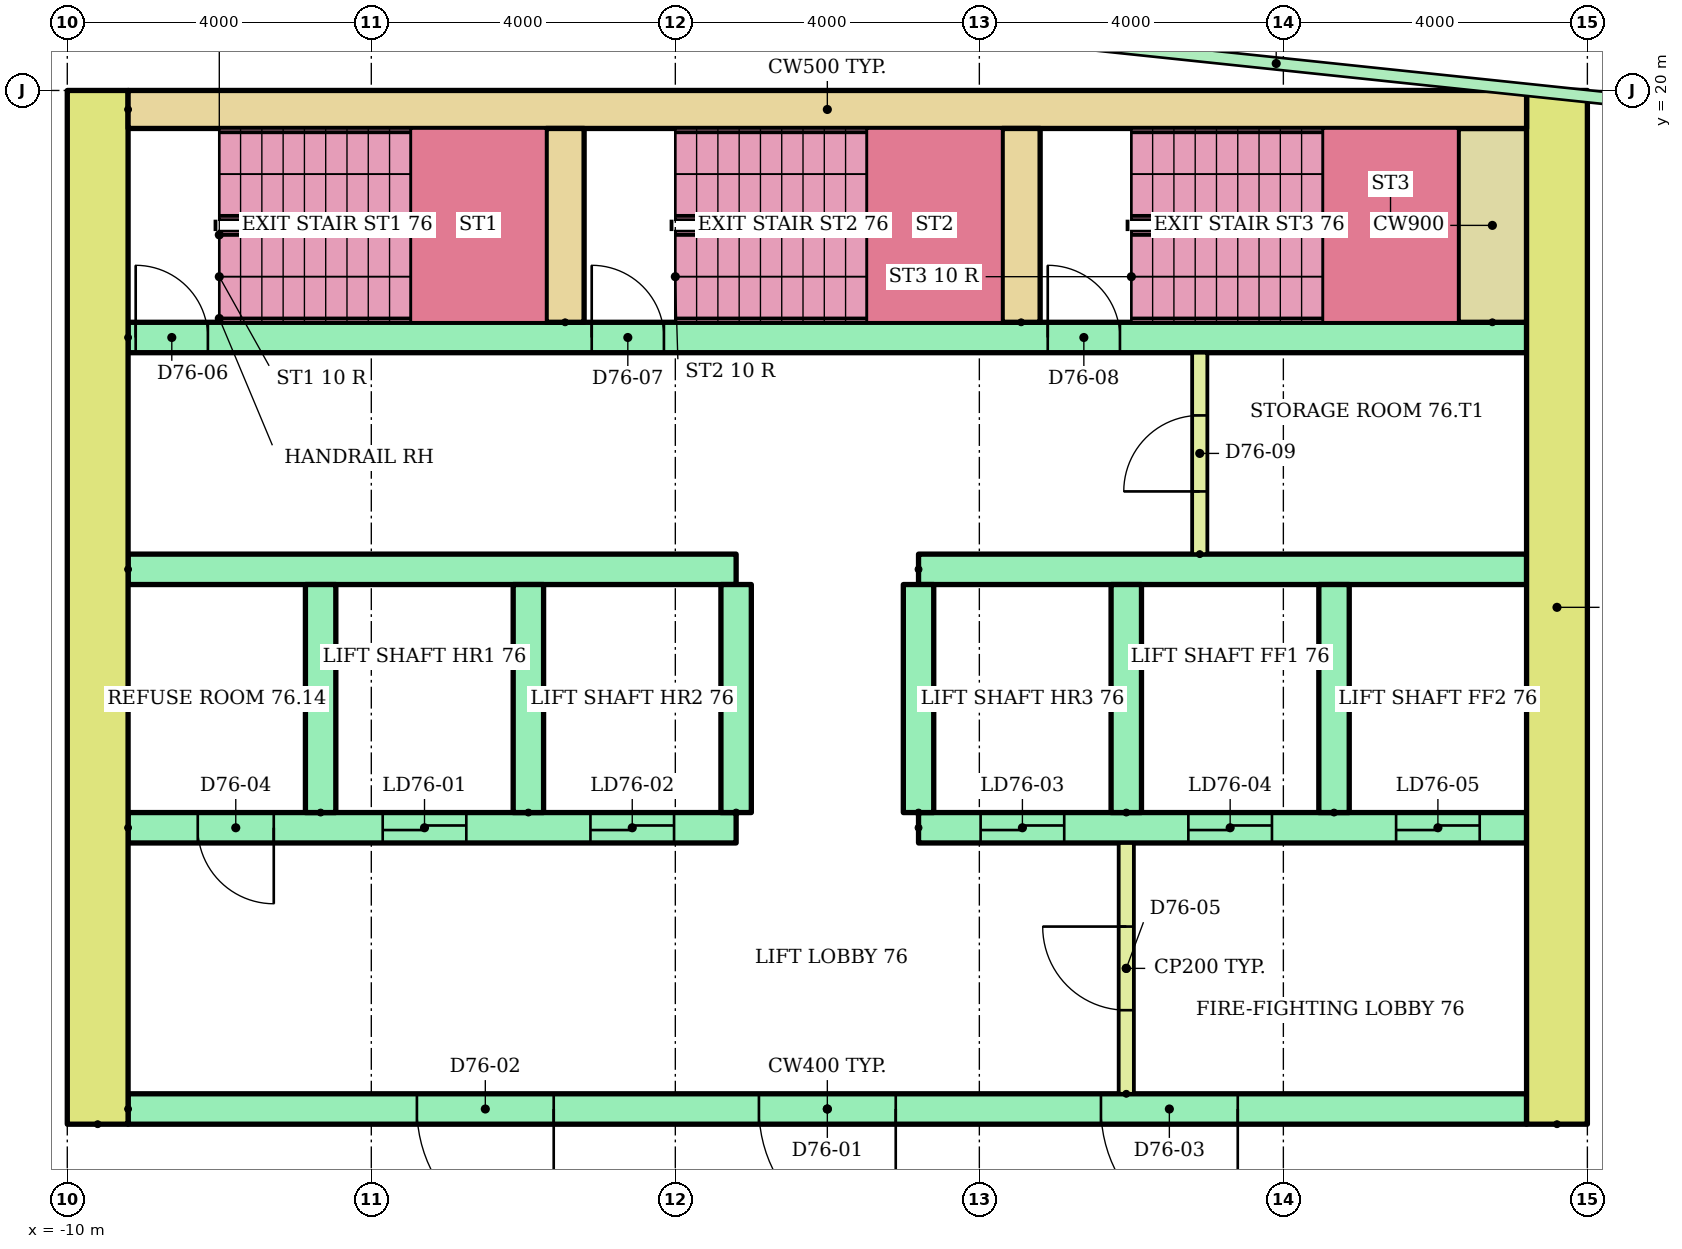
"""IFC4 building model, lengths in metres.
Left out: names, types, materials, properties, quantities, classifications, styles, units other than length and angle.
Written with IfcOpenShell. Run it as: python <this file> out.ifc"""

import sys

from ifc_helpers import new_model, si_unit, direction, frame, frame_2d, origin, place, context, subcontext, project, spatial, rectangle, extrude, element, fill, save


model = new_model("IFC4")
c1 = context("Model", 3, precision=1e-05, world=origin(), true_north=direction((0.0, 1.0)))
c2 = subcontext(c1, "Body", "Model", "MODEL_VIEW")
j1 = project(units=[si_unit("LENGTHUNIT", "METRE"), si_unit("PLANEANGLEUNIT", "RADIAN")], contexts=[c1])
p1 = place(None, origin())
s1 = spatial("IfcSite", under=j1, at=p1, CompositionType="ELEMENT")
p2 = place(p1, origin())
s2 = spatial("IfcBuilding", under=s1, at=p2, CompositionType="ELEMENT")
p3 = place(p2, frame((0.0, 0.0, 294.9)))
s3 = spatial("IfcBuildingStorey", under=s2, at=p3, CompositionType="ELEMENT", Elevation=294.9)
for number, where, z_axis, x_axis in (
    (1, (-9.6, 6.4, 0.0), (0.0, 0.0, 1.0), (0.0, 1.0, 0.0)),
    (2, (9.6, 6.4, 0.0), (0.0, 0.0, 1.0), (0.0, 1.0, 0.0)),
):
    element("IfcWall", number, at=place(p3, frame(where, z_axis=z_axis, x_axis=x_axis)), inside=s3, PredefinedType="SHEAR", context=c2, shape_type="SweptSolid", body=[
        extrude(rectangle(XDim=13.6, YDim=0.8, at=frame_2d((6.8, 0.0))), origin(), (0.0, 0.0, 1.0), 3.12),
    ])
p4 = place(p3, frame((-9.2, 19.75, 0.0)))
e3 = element("IfcWall", 3, at=p4, inside=s3, PredefinedType="SHEAR", context=c2, shape_type="SweptSolid", body=[
    extrude(rectangle(XDim=18.4, YDim=0.5, at=frame_2d((9.2, 0.0))), origin(), (0.0, 0.0, 1.0), 3.12),
])
p5 = place(p3, frame((-9.2, 6.6, 0.0)))
e4 = element("IfcWall", 4, at=p5, inside=s3, PredefinedType="SHEAR", context=c2, shape_type="SweptSolid", body=[
    extrude(rectangle(XDim=18.4, YDim=0.4, at=frame_2d((9.2, 0.0))), origin(), (0.0, 0.0, 1.0), 3.12),
])
p6 = place(p5, frame((8.3, 0.0, 0.0)))
e5 = element("IfcOpeningElement", 5, at=p6, cuts=e4, PredefinedType="OPENING", context=c2, shape_type="SweptSolid", body=[
    extrude(rectangle(XDim=1.8, YDim=2.1, at=frame_2d((0.9, 1.05))), frame((0.0, 0.21, 0.0), z_axis=(0.0, -1.0, 0.0), x_axis=(1.0, 0.0, 0.0)), (0.0, 0.0, 1.0), 0.42),
])
p7 = place(p5, frame((3.8, 0.0, 0.0)))
e6 = element("IfcOpeningElement", 6, at=p7, cuts=e4, PredefinedType="OPENING", context=c2, shape_type="SweptSolid", body=[
    extrude(rectangle(XDim=1.8, YDim=2.1, at=frame_2d((0.9, 1.05))), frame((0.0, 0.21, 0.0), z_axis=(0.0, -1.0, 0.0), x_axis=(1.0, 0.0, 0.0)), (0.0, 0.0, 1.0), 0.42),
])
p8 = place(p5, frame((12.8, 0.0, 0.0)))
e7 = element("IfcOpeningElement", 7, at=p8, cuts=e4, PredefinedType="OPENING", context=c2, shape_type="SweptSolid", body=[
    extrude(rectangle(XDim=1.8, YDim=2.1, at=frame_2d((0.9, 1.05))), frame((0.0, 0.21, 0.0), z_axis=(0.0, -1.0, 0.0), x_axis=(1.0, 0.0, 0.0)), (0.0, 0.0, 1.0), 0.42),
])
p9 = place(p3, frame((-9.2, 10.3, 0.0)))
e8 = element("IfcWall", 8, at=p9, inside=s3, PredefinedType="SHEAR", context=c2, shape_type="SweptSolid", body=[
    extrude(rectangle(XDim=8.0, YDim=0.4, at=frame_2d((4.0, 0.0))), origin(), (0.0, 0.0, 1.0), 3.12),
])
p10 = place(p9, frame((3.35, 0.0, 0.0)))
e9 = element("IfcOpeningElement", 9, at=p10, cuts=e8, PredefinedType="OPENING", context=c2, shape_type="SweptSolid", body=[
    extrude(rectangle(XDim=1.1, YDim=2.1, at=frame_2d((0.55, 1.05))), frame((0.0, 0.21, 0.0), z_axis=(0.0, -1.0, 0.0), x_axis=(1.0, 0.0, 0.0)), (0.0, 0.0, 1.0), 0.42),
])
p11 = place(p9, frame((6.083, 0.0, 0.0)))
e10 = element("IfcOpeningElement", 10, at=p11, cuts=e8, PredefinedType="OPENING", context=c2, shape_type="SweptSolid", body=[
    extrude(rectangle(XDim=1.1, YDim=2.1, at=frame_2d((0.55, 1.05))), frame((0.0, 0.21, 0.0), z_axis=(0.0, -1.0, 0.0), x_axis=(1.0, 0.0, 0.0)), (0.0, 0.0, 1.0), 0.42),
])
p12 = place(p9, frame((0.917, 0.0, 0.0)))
e11 = element("IfcOpeningElement", 11, at=p12, cuts=e8, PredefinedType="OPENING", context=c2, shape_type="SweptSolid", body=[
    extrude(rectangle(XDim=1.0, YDim=2.1, at=frame_2d((0.5, 1.05))), frame((0.0, 0.21, 0.0), z_axis=(0.0, -1.0, 0.0), x_axis=(1.0, 0.0, 0.0)), (0.0, 0.0, 1.0), 0.42),
])
p13 = place(p3, frame((-9.2, 13.7, 0.0)))
e12 = element("IfcWall", 12, at=p13, inside=s3, PredefinedType="SHEAR", context=c2, shape_type="SweptSolid", body=[
    extrude(rectangle(XDim=8.0, YDim=0.4, at=frame_2d((4.0, 0.0))), origin(), (0.0, 0.0, 1.0), 3.12),
])
p14 = place(p3, frame((1.2, 10.3, 0.0)))
e13 = element("IfcWall", 13, at=p14, inside=s3, PredefinedType="SHEAR", context=c2, shape_type="SweptSolid", body=[
    extrude(rectangle(XDim=8.0, YDim=0.4, at=frame_2d((4.0, 0.0))), origin(), (0.0, 0.0, 1.0), 3.12),
])
p15 = place(p14, frame((0.817, 0.0, 0.0)))
e14 = element("IfcOpeningElement", 14, at=p15, cuts=e13, PredefinedType="OPENING", context=c2, shape_type="SweptSolid", body=[
    extrude(rectangle(XDim=1.1, YDim=2.1, at=frame_2d((0.55, 1.05))), frame((0.0, 0.21, 0.0), z_axis=(0.0, -1.0, 0.0), x_axis=(1.0, 0.0, 0.0)), (0.0, 0.0, 1.0), 0.42),
])
p16 = place(p14, frame((3.55, 0.0, 0.0)))
e15 = element("IfcOpeningElement", 15, at=p16, cuts=e13, PredefinedType="OPENING", context=c2, shape_type="SweptSolid", body=[
    extrude(rectangle(XDim=1.1, YDim=2.1, at=frame_2d((0.55, 1.05))), frame((0.0, 0.21, 0.0), z_axis=(0.0, -1.0, 0.0), x_axis=(1.0, 0.0, 0.0)), (0.0, 0.0, 1.0), 0.42),
])
p17 = place(p14, frame((6.283, 0.0, 0.0)))
e16 = element("IfcOpeningElement", 16, at=p17, cuts=e13, PredefinedType="OPENING", context=c2, shape_type="SweptSolid", body=[
    extrude(rectangle(XDim=1.1, YDim=2.1, at=frame_2d((0.55, 1.05))), frame((0.0, 0.21, 0.0), z_axis=(0.0, -1.0, 0.0), x_axis=(1.0, 0.0, 0.0)), (0.0, 0.0, 1.0), 0.42),
])
p18 = place(p3, frame((1.2, 13.7, 0.0)))
e17 = element("IfcWall", 17, at=p18, inside=s3, PredefinedType="SHEAR", context=c2, shape_type="SweptSolid", body=[
    extrude(rectangle(XDim=8.0, YDim=0.4, at=frame_2d((4.0, 0.0))), origin(), (0.0, 0.0, 1.0), 3.12),
])
for number, where, z_axis, x_axis in (
    (18, (-6.667, 10.5, 0.0), (0.0, 0.0, 1.0), (0.0, 1.0, 0.0)),
    (19, (-3.933, 10.5, 0.0), (0.0, 0.0, 1.0), (0.0, 1.0, 0.0)),
    (20, (-1.2, 10.5, 0.0), (0.0, 0.0, 1.0), (0.0, 1.0, 0.0)),
    (21, (1.2, 10.5, 0.0), (0.0, 0.0, 1.0), (0.0, 1.0, 0.0)),
    (22, (3.933, 10.5, 0.0), (0.0, 0.0, 1.0), (0.0, 1.0, 0.0)),
    (23, (6.667, 10.5, 0.0), (0.0, 0.0, 1.0), (0.0, 1.0, 0.0)),
):
    element("IfcWall", number, at=place(p3, frame(where, z_axis=z_axis, x_axis=x_axis)), inside=s3, PredefinedType="SHEAR", context=c2, shape_type="SweptSolid", body=[
        extrude(rectangle(XDim=3.0, YDim=0.4, at=frame_2d((1.5, 0.0))), origin(), (0.0, 0.0, 1.0), 3.12),
    ])
p19 = place(p3, frame((3.933, 6.8, 0.0), z_axis=(0.0, 0.0, 1.0), x_axis=(0.0, 1.0, 0.0)))
e24 = element("IfcWall", 24, at=p19, inside=s3, PredefinedType="PARTITIONING", context=c2, shape_type="SweptSolid", body=[
    extrude(rectangle(XDim=3.3, YDim=0.2, at=frame_2d((1.65, 0.0))), origin(), (0.0, 0.0, 1.0), 3.12),
])
p20 = place(p19, frame((1.1, 0.0, 0.0)))
e25 = element("IfcOpeningElement", 25, at=p20, cuts=e24, PredefinedType="OPENING", context=c2, shape_type="SweptSolid", body=[
    extrude(rectangle(XDim=1.1, YDim=2.1, at=frame_2d((0.55, 1.05))), frame((0.0, 0.11, 0.0), z_axis=(0.0, -1.0, 0.0), x_axis=(1.0, 0.0, 0.0)), (0.0, 0.0, 1.0), 0.22),
])
p21 = place(p3, frame((-9.2, 16.75, 0.0)))
e26 = element("IfcWall", 26, at=p21, inside=s3, PredefinedType="SHEAR", context=c2, shape_type="SweptSolid", body=[
    extrude(rectangle(XDim=18.4, YDim=0.4, at=frame_2d((9.2, 0.0))), origin(), (0.0, 0.0, 1.0), 3.12),
])
p22 = place(p21, frame((0.1, 0.0, 0.0)))
e27 = element("IfcOpeningElement", 27, at=p22, cuts=e26, PredefinedType="OPENING", context=c2, shape_type="SweptSolid", body=[
    extrude(rectangle(XDim=0.95, YDim=2.1, at=frame_2d((0.475, 1.05))), frame((0.0, 0.21, 0.0), z_axis=(0.0, -1.0, 0.0), x_axis=(1.0, 0.0, 0.0)), (0.0, 0.0, 1.0), 0.42),
])
p23 = place(p21, frame((6.1, 0.0, 0.0)))
e28 = element("IfcOpeningElement", 28, at=p23, cuts=e26, PredefinedType="OPENING", context=c2, shape_type="SweptSolid", body=[
    extrude(rectangle(XDim=0.95, YDim=2.1, at=frame_2d((0.475, 1.05))), frame((0.0, 0.21, 0.0), z_axis=(0.0, -1.0, 0.0), x_axis=(1.0, 0.0, 0.0)), (0.0, 0.0, 1.0), 0.42),
])
p24 = place(p21, frame((12.1, 0.0, 0.0)))
e29 = element("IfcOpeningElement", 29, at=p24, cuts=e26, PredefinedType="OPENING", context=c2, shape_type="SweptSolid", body=[
    extrude(rectangle(XDim=0.95, YDim=2.1, at=frame_2d((0.475, 1.05))), frame((0.0, 0.21, 0.0), z_axis=(0.0, -1.0, 0.0), x_axis=(1.0, 0.0, 0.0)), (0.0, 0.0, 1.0), 0.42),
])
for number, where, z_axis, x_axis in (
    (30, (-3.45, 16.95, 0.0), (0.0, 0.0, 1.0), (0.0, 1.0, 0.0)),
    (31, (2.55, 16.95, 0.0), (0.0, 0.0, 1.0), (0.0, 1.0, 0.0)),
):
    element("IfcWall", number, at=place(p3, frame(where, z_axis=z_axis, x_axis=x_axis)), inside=s3, PredefinedType="SHEAR", context=c2, shape_type="SweptSolid", body=[
        extrude(rectangle(XDim=2.55, YDim=0.5, at=frame_2d((1.275, 0.0))), origin(), (0.0, 0.0, 1.0), 3.12),
    ])
p25 = place(p3, frame((8.75, 16.95, 0.0), z_axis=(0.0, 0.0, 1.0), x_axis=(0.0, 1.0, 0.0)))
e32 = element("IfcWall", 32, at=p25, inside=s3, PredefinedType="SHEAR", context=c2, shape_type="SweptSolid", body=[
    extrude(rectangle(XDim=2.55, YDim=0.9, at=frame_2d((1.275, 0.0))), origin(), (0.0, 0.0, 1.0), 3.12),
])
p26 = place(p3, frame((4.9, 13.9, 0.0), z_axis=(0.0, 0.0, 1.0), x_axis=(0.0, 1.0, 0.0)))
e33 = element("IfcWall", 33, at=p26, inside=s3, PredefinedType="PARTITIONING", context=c2, shape_type="SweptSolid", body=[
    extrude(rectangle(XDim=2.65, YDim=0.2, at=frame_2d((1.325, 0.0))), origin(), (0.0, 0.0, 1.0), 3.12),
])
p27 = place(p26, frame((0.825, 0.0, 0.0)))
e34 = element("IfcOpeningElement", 34, at=p27, cuts=e33, PredefinedType="OPENING", context=c2, shape_type="SweptSolid", body=[
    extrude(rectangle(XDim=1.0, YDim=2.1, at=frame_2d((0.5, 1.05))), frame((0.0, 0.11, 0.0), z_axis=(0.0, -1.0, 0.0), x_axis=(1.0, 0.0, 0.0)), (0.0, 0.0, 1.0), 0.22),
])
p28 = place(p6, frame((1.8, 0.0, 0.0), z_axis=(0.0, 0.0, 1.0), x_axis=(-1.0, 0.0, 0.0)))
e35 = element("IfcDoor", 35, at=p28, inside=s3, OperationType="DOUBLE_DOOR_SINGLE_SWING", PredefinedType="DOOR", context=c2, shape_type="SweptSolid", body=[
    extrude(rectangle(XDim=1.8, YDim=2.1, at=frame_2d((0.9, 1.05))), frame((0.0, 0.025, 0.0), z_axis=(0.0, -1.0, 0.0), x_axis=(1.0, 0.0, 0.0)), (0.0, 0.0, 1.0), 0.05),
])
fill(e5, e35)
p29 = place(p7, frame((1.8, 0.0, 0.0), z_axis=(0.0, 0.0, 1.0), x_axis=(-1.0, 0.0, 0.0)))
e36 = element("IfcDoor", 36, at=p29, inside=s3, OperationType="DOUBLE_DOOR_SINGLE_SWING", PredefinedType="DOOR", context=c2, shape_type="SweptSolid", body=[
    extrude(rectangle(XDim=1.8, YDim=2.1, at=frame_2d((0.9, 1.05))), frame((0.0, 0.025, 0.0), z_axis=(0.0, -1.0, 0.0), x_axis=(1.0, 0.0, 0.0)), (0.0, 0.0, 1.0), 0.05),
])
fill(e6, e36)
p30 = place(p8, frame((1.8, 0.0, 0.0), z_axis=(0.0, 0.0, 1.0), x_axis=(-1.0, 0.0, 0.0)))
e37 = element("IfcDoor", 37, at=p30, inside=s3, OperationType="DOUBLE_DOOR_SINGLE_SWING", PredefinedType="DOOR", context=c2, shape_type="SweptSolid", body=[
    extrude(rectangle(XDim=1.8, YDim=2.1, at=frame_2d((0.9, 1.05))), frame((0.0, 0.025, 0.0), z_axis=(0.0, -1.0, 0.0), x_axis=(1.0, 0.0, 0.0)), (0.0, 0.0, 1.0), 0.05),
])
fill(e7, e37)
p31 = place(p10, origin())
e38 = element("IfcDoor", 38, at=p31, inside=s3, OperationType="SLIDING_TO_LEFT", PredefinedType="DOOR", context=c2, shape_type="SweptSolid", body=[
    extrude(rectangle(XDim=1.1, YDim=2.1, at=frame_2d((0.55, 1.05))), frame((0.0, 0.025, 0.0), z_axis=(0.0, -1.0, 0.0), x_axis=(1.0, 0.0, 0.0)), (0.0, 0.0, 1.0), 0.05),
])
fill(e9, e38)
p32 = place(p11, origin())
e39 = element("IfcDoor", 39, at=p32, inside=s3, OperationType="SLIDING_TO_LEFT", PredefinedType="DOOR", context=c2, shape_type="SweptSolid", body=[
    extrude(rectangle(XDim=1.1, YDim=2.1, at=frame_2d((0.55, 1.05))), frame((0.0, 0.025, 0.0), z_axis=(0.0, -1.0, 0.0), x_axis=(1.0, 0.0, 0.0)), (0.0, 0.0, 1.0), 0.05),
])
fill(e10, e39)
p33 = place(p15, origin())
e40 = element("IfcDoor", 40, at=p33, inside=s3, OperationType="SLIDING_TO_LEFT", PredefinedType="DOOR", context=c2, shape_type="SweptSolid", body=[
    extrude(rectangle(XDim=1.1, YDim=2.1, at=frame_2d((0.55, 1.05))), frame((0.0, 0.025, 0.0), z_axis=(0.0, -1.0, 0.0), x_axis=(1.0, 0.0, 0.0)), (0.0, 0.0, 1.0), 0.05),
])
fill(e14, e40)
p34 = place(p16, origin())
e41 = element("IfcDoor", 41, at=p34, inside=s3, OperationType="SLIDING_TO_LEFT", PredefinedType="DOOR", context=c2, shape_type="SweptSolid", body=[
    extrude(rectangle(XDim=1.1, YDim=2.1, at=frame_2d((0.55, 1.05))), frame((0.0, 0.025, 0.0), z_axis=(0.0, -1.0, 0.0), x_axis=(1.0, 0.0, 0.0)), (0.0, 0.0, 1.0), 0.05),
])
fill(e15, e41)
p35 = place(p17, origin())
e42 = element("IfcDoor", 42, at=p35, inside=s3, OperationType="SLIDING_TO_LEFT", PredefinedType="DOOR", context=c2, shape_type="SweptSolid", body=[
    extrude(rectangle(XDim=1.1, YDim=2.1, at=frame_2d((0.55, 1.05))), frame((0.0, 0.025, 0.0), z_axis=(0.0, -1.0, 0.0), x_axis=(1.0, 0.0, 0.0)), (0.0, 0.0, 1.0), 0.05),
])
fill(e16, e42)
p36 = place(p12, frame((1.0, 0.0, 0.0), z_axis=(0.0, 0.0, 1.0), x_axis=(-1.0, 0.0, 0.0)))
e43 = element("IfcDoor", 43, at=p36, inside=s3, OperationType="SINGLE_SWING_RIGHT", PredefinedType="DOOR", context=c2, shape_type="SweptSolid", body=[
    extrude(rectangle(XDim=1.0, YDim=2.1, at=frame_2d((0.5, 1.05))), frame((0.0, 0.025, 0.0), z_axis=(0.0, -1.0, 0.0), x_axis=(1.0, 0.0, 0.0)), (0.0, 0.0, 1.0), 0.05),
])
fill(e11, e43)
p37 = place(p20, origin())
e44 = element("IfcDoor", 44, at=p37, inside=s3, OperationType="SINGLE_SWING_RIGHT", PredefinedType="DOOR", context=c2, shape_type="SweptSolid", body=[
    extrude(rectangle(XDim=1.1, YDim=2.1, at=frame_2d((0.55, 1.05))), frame((0.0, 0.025, 0.0), z_axis=(0.0, -1.0, 0.0), x_axis=(1.0, 0.0, 0.0)), (0.0, 0.0, 1.0), 0.05),
])
fill(e25, e44)
p38 = place(p22, origin())
e45 = element("IfcDoor", 45, at=p38, inside=s3, OperationType="SINGLE_SWING_LEFT", PredefinedType="DOOR", context=c2, shape_type="SweptSolid", body=[
    extrude(rectangle(XDim=0.95, YDim=2.1, at=frame_2d((0.475, 1.05))), frame((0.0, 0.025, 0.0), z_axis=(0.0, -1.0, 0.0), x_axis=(1.0, 0.0, 0.0)), (0.0, 0.0, 1.0), 0.05),
])
fill(e27, e45)
p39 = place(p23, origin())
e46 = element("IfcDoor", 46, at=p39, inside=s3, OperationType="SINGLE_SWING_LEFT", PredefinedType="DOOR", context=c2, shape_type="SweptSolid", body=[
    extrude(rectangle(XDim=0.95, YDim=2.1, at=frame_2d((0.475, 1.05))), frame((0.0, 0.025, 0.0), z_axis=(0.0, -1.0, 0.0), x_axis=(1.0, 0.0, 0.0)), (0.0, 0.0, 1.0), 0.05),
])
fill(e28, e46)
p40 = place(p24, origin())
e47 = element("IfcDoor", 47, at=p40, inside=s3, OperationType="SINGLE_SWING_LEFT", PredefinedType="DOOR", context=c2, shape_type="SweptSolid", body=[
    extrude(rectangle(XDim=0.95, YDim=2.1, at=frame_2d((0.475, 1.05))), frame((0.0, 0.025, 0.0), z_axis=(0.0, -1.0, 0.0), x_axis=(1.0, 0.0, 0.0)), (0.0, 0.0, 1.0), 0.05),
])
fill(e29, e47)
p41 = place(p27, origin())
e48 = element("IfcDoor", 48, at=p41, inside=s3, OperationType="SINGLE_SWING_LEFT", PredefinedType="DOOR", context=c2, shape_type="SweptSolid", body=[
    extrude(rectangle(XDim=1.0, YDim=2.1, at=frame_2d((0.5, 1.05))), frame((0.0, 0.025, 0.0), z_axis=(0.0, -1.0, 0.0), x_axis=(1.0, 0.0, 0.0)), (0.0, 0.0, 1.0), 0.05),
])
fill(e34, e48)
save(model, sys.argv[1])
